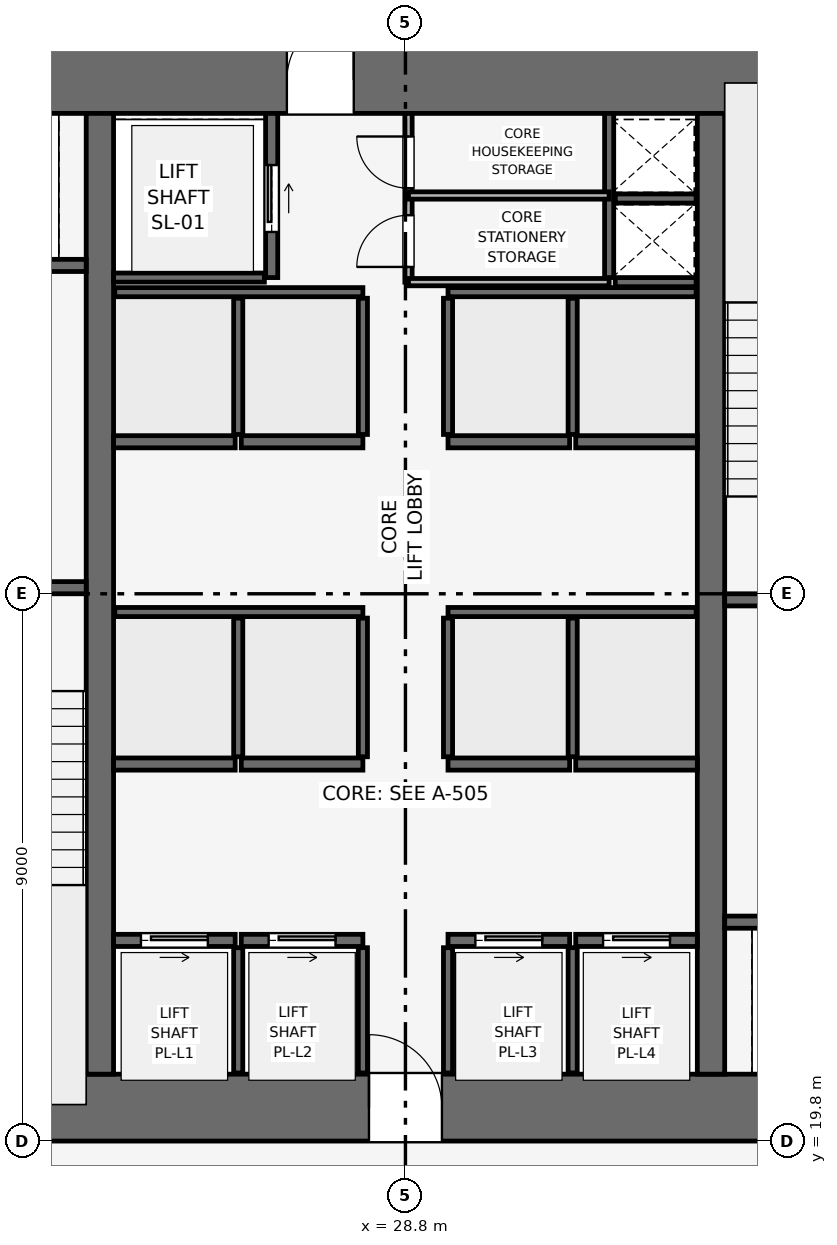
"""IFC4 building model, lengths in metres.
Left out: names, types, materials, properties, quantities, classifications, styles, units other than length and angle.
Written with IfcOpenShell. Run it as: python <this file> out.ifc"""

import sys

from ifc_helpers import new_model, si_unit, direction, frame, frame_2d, origin, place, context, subcontext, project, spatial, rectangle, extrude, element, fill, save


model = new_model("IFC4")
c1 = context("Model", 3, precision=1e-05, world=origin(), true_north=direction((0.0, 1.0)))
c2 = subcontext(c1, "Body", "Model", "MODEL_VIEW")
j1 = project(units=[si_unit("LENGTHUNIT", "METRE"), si_unit("PLANEANGLEUNIT", "RADIAN")], contexts=[c1])
p1 = place(None, origin())
s1 = spatial("IfcSite", under=j1, at=p1, CompositionType="ELEMENT")
p2 = place(p1, origin())
s2 = spatial("IfcBuilding", under=s1, at=p2, CompositionType="ELEMENT")
p3 = place(p2, frame((0.0, 0.0, 104.1)))
s3 = spatial("IfcBuildingStorey", under=s2, at=p3, CompositionType="ELEMENT", Elevation=104.1)
p4 = place(p3, frame((19.8, 20.35, 0.0), z_axis=(0.0, 0.0, 1.0), x_axis=(1.0, 0.0, 0.0)))
e1 = element("IfcWall", 1, at=p4, inside=s3, PredefinedType="SHEAR", context=c2, shape_type="SweptSolid", body=[
    extrude(rectangle(XDim=18.0, YDim=1.1, at=frame_2d((9.0, 0.0))), origin(), (0.0, 0.0, 1.0), 3.9),
])
p5 = place(p4, frame((8.4, 0.0, 0.0)))
e2 = element("IfcOpeningElement", 2, at=p5, cuts=e1, PredefinedType="OPENING", context=c2, shape_type="SweptSolid", body=[
    extrude(rectangle(XDim=1.2, YDim=2.2, at=frame_2d((0.6, 1.1))), frame((0.0, 0.56, 0.0), z_axis=(0.0, -1.0, 0.0), x_axis=(1.0, 0.0, 0.0)), (0.0, 0.0, 1.0), 1.12),
])
p6 = place(p3, frame((19.8, 37.25, 0.0), z_axis=(0.0, 0.0, 1.0), x_axis=(1.0, 0.0, 0.0)))
e3 = element("IfcWall", 3, at=p6, inside=s3, PredefinedType="SHEAR", context=c2, shape_type="SweptSolid", body=[
    extrude(rectangle(XDim=18.0, YDim=1.1, at=frame_2d((9.0, 0.0))), origin(), (0.0, 0.0, 1.0), 3.9),
])
p7 = place(p6, frame((7.05, 0.0, 0.0)))
e4 = element("IfcOpeningElement", 4, at=p7, cuts=e3, PredefinedType="OPENING", context=c2, shape_type="SweptSolid", body=[
    extrude(rectangle(XDim=1.1, YDim=2.15, at=frame_2d((0.55, 1.075))), frame((0.0, 0.56, 0.0), z_axis=(0.0, -1.0, 0.0), x_axis=(1.0, 0.0, 0.0)), (0.0, 0.0, 1.0), 1.12),
])
for number, where, z_axis, x_axis in (
    (5, (23.775, 20.9, 0.0), (0.0, 0.0, 1.0), (0.0, 1.0, 0.0)),
    (6, (33.825, 20.9, 0.0), (0.0, 0.0, 1.0), (0.0, 1.0, 0.0)),
):
    element("IfcWall", number, at=place(p3, frame(where, z_axis=z_axis, x_axis=x_axis)), inside=s3, PredefinedType="SHEAR", context=c2, shape_type="SweptSolid", body=[
        extrude(rectangle(XDim=15.8, YDim=0.45, at=frame_2d((7.9, 0.0))), origin(), (0.0, 0.0, 1.0), 3.9),
    ])
p8 = place(p3, frame((20.4, 28.9, 0.0), z_axis=(0.0, 0.0, 1.0), x_axis=(1.0, 0.0, 0.0)))
e7 = element("IfcWall", 7, at=p8, inside=s3, PredefinedType="SHEAR", context=c2, shape_type="SweptSolid", body=[
    extrude(rectangle(XDim=3.15, YDim=0.2, at=frame_2d((1.575, 0.0))), origin(), (0.0, 0.0, 1.0), 3.54),
])
p9 = place(p8, frame((0.8, 0.0, 0.0)))
e8 = element("IfcOpeningElement", 8, at=p9, cuts=e7, PredefinedType="OPENING", context=c2, shape_type="SweptSolid", body=[
    extrude(rectangle(XDim=1.0, YDim=2.1, at=frame_2d((0.5, 1.05))), frame((0.0, 0.11, 0.0), z_axis=(0.0, -1.0, 0.0), x_axis=(1.0, 0.0, 0.0)), (0.0, 0.0, 1.0), 0.22),
])
p10 = place(p3, frame((34.05, 28.7, 0.0), z_axis=(0.0, 0.0, 1.0), x_axis=(1.0, 0.0, 0.0)))
e9 = element("IfcWall", 9, at=p10, inside=s3, PredefinedType="SHEAR", context=c2, shape_type="SweptSolid", body=[
    extrude(rectangle(XDim=3.15, YDim=0.2, at=frame_2d((1.575, 0.0))), origin(), (0.0, 0.0, 1.0), 3.54),
])
p11 = place(p10, frame((0.8, 0.0, 0.0)))
e10 = element("IfcOpeningElement", 10, at=p11, cuts=e9, PredefinedType="OPENING", context=c2, shape_type="SweptSolid", body=[
    extrude(rectangle(XDim=1.0, YDim=2.1, at=frame_2d((0.5, 1.05))), frame((0.0, 0.11, 0.0), z_axis=(0.0, -1.0, 0.0), x_axis=(1.0, 0.0, 0.0)), (0.0, 0.0, 1.0), 0.22),
])
p12 = place(p3, frame((32.15, 34.0, 0.0), z_axis=(0.0, 0.0, 1.0), x_axis=(0.0, 1.0, 0.0)))
e11 = element("IfcWall", 11, at=p12, inside=s3, PredefinedType="SHEAR", context=c2, shape_type="SweptSolid", body=[
    extrude(rectangle(XDim=2.7, YDim=0.15, at=frame_2d((1.35, 0.0))), origin(), (0.0, 0.0, 1.0), 3.54),
])
for number, where, z_axis, x_axis in (
    (12, (32.25, 33.925, 0.0), (0.0, 0.0, 1.0), (1.0, 0.0, 0.0)),
    (13, (32.25, 35.3, 0.0), (0.0, 0.0, 1.0), (1.0, 0.0, 0.0)),
):
    element("IfcWall", number, at=place(p3, frame(where, z_axis=z_axis, x_axis=x_axis)), inside=s3, PredefinedType="SHEAR", context=c2, shape_type="SweptSolid", body=[
        extrude(rectangle(XDim=1.33, YDim=0.15, at=frame_2d((0.665, 0.0))), origin(), (0.0, 0.0, 1.0), 3.54),
    ])
p13 = place(p3, frame((20.5, 34.2, 0.0), z_axis=(0.0, 0.0, 1.0), x_axis=(1.0, 0.0, 0.0)))
e14 = element("IfcWall", 14, at=p13, inside=s3, PredefinedType="SHEAR", context=c2, shape_type="SweptSolid", body=[
    extrude(rectangle(XDim=3.05, YDim=0.2, at=frame_2d((1.525, 0.0))), origin(), (0.0, 0.0, 1.0), 3.54),
])
p14 = place(p13, frame((0.75, 0.0, 0.0)))
e15 = element("IfcOpeningElement", 15, at=p14, cuts=e14, PredefinedType="OPENING", context=c2, shape_type="SweptSolid", body=[
    extrude(rectangle(XDim=1.1, YDim=2.15, at=frame_2d((0.55, 1.075))), frame((0.0, 0.11, 0.0), z_axis=(0.0, -1.0, 0.0), x_axis=(1.0, 0.0, 0.0)), (0.0, 0.0, 1.0), 0.22),
])
p15 = place(p3, frame((34.05, 23.4, 0.0), z_axis=(0.0, 0.0, 1.0), x_axis=(1.0, 0.0, 0.0)))
e16 = element("IfcWall", 16, at=p15, inside=s3, PredefinedType="SHEAR", context=c2, shape_type="SweptSolid", body=[
    extrude(rectangle(XDim=3.05, YDim=0.2, at=frame_2d((1.525, 0.0))), origin(), (0.0, 0.0, 1.0), 3.54),
])
p16 = place(p15, frame((1.2, 0.0, 0.0)))
e17 = element("IfcOpeningElement", 17, at=p16, cuts=e16, PredefinedType="OPENING", context=c2, shape_type="SweptSolid", body=[
    extrude(rectangle(XDim=1.1, YDim=2.15, at=frame_2d((0.55, 1.075))), frame((0.0, 0.11, 0.0), z_axis=(0.0, -1.0, 0.0), x_axis=(1.0, 0.0, 0.0)), (0.0, 0.0, 1.0), 0.22),
])
p17 = place(p3, frame((26.6, 34.0, 0.0), z_axis=(0.0, 0.0, 1.0), x_axis=(0.0, 1.0, 0.0)))
e18 = element("IfcWall", 18, at=p17, inside=s3, PredefinedType="SHEAR", context=c2, shape_type="SweptSolid", body=[
    extrude(rectangle(XDim=2.7, YDim=0.2, at=frame_2d((1.35, 0.0))), origin(), (0.0, 0.0, 1.0), 3.54),
])
p18 = place(p17, frame((0.75, 0.0, 0.0)))
e19 = element("IfcOpeningElement", 19, at=p18, cuts=e18, PredefinedType="OPENING", context=c2, shape_type="SweptSolid", body=[
    extrude(rectangle(XDim=1.1, YDim=2.15, at=frame_2d((0.55, 1.075))), frame((0.0, 0.11, 0.0), z_axis=(0.0, -1.0, 0.0), x_axis=(1.0, 0.0, 0.0)), (0.0, 0.0, 1.0), 0.22),
])
p19 = place(p3, frame((24.0, 34.0, 0.0), z_axis=(0.0, 0.0, 1.0), x_axis=(1.0, 0.0, 0.0)))
e20 = element("IfcWall", 20, at=p19, inside=s3, PredefinedType="SHEAR", context=c2, shape_type="SweptSolid", body=[
    extrude(rectangle(XDim=2.48, YDim=0.15, at=frame_2d((1.24, 0.0))), origin(), (0.0, 0.0, 1.0), 3.54),
])
p20 = place(p3, frame((24.0, 23.1, 0.0), z_axis=(0.0, 0.0, 1.0), x_axis=(1.0, 0.0, 0.0)))
e21 = element("IfcWall", 21, at=p20, inside=s3, PredefinedType="SHEAR", context=c2, shape_type="SweptSolid", body=[
    extrude(rectangle(XDim=2.0, YDim=0.2, at=frame_2d((1.0, 0.0))), origin(), (0.0, 0.0, 1.0), 3.54),
])
p21 = place(p20, frame((0.45, 0.0, 0.0)))
e22 = element("IfcOpeningElement", 22, at=p21, cuts=e21, PredefinedType="OPENING", context=c2, shape_type="SweptSolid", body=[
    extrude(rectangle(XDim=1.1, YDim=2.15, at=frame_2d((0.55, 1.075))), frame((0.0, 0.11, 0.0), z_axis=(0.0, -1.0, 0.0), x_axis=(1.0, 0.0, 0.0)), (0.0, 0.0, 1.0), 0.22),
])
p22 = place(p3, frame((26.1, 23.1, 0.0), z_axis=(0.0, 0.0, 1.0), x_axis=(1.0, 0.0, 0.0)))
e23 = element("IfcWall", 23, at=p22, inside=s3, PredefinedType="SHEAR", context=c2, shape_type="SweptSolid", body=[
    extrude(rectangle(XDim=2.0, YDim=0.2, at=frame_2d((1.0, 0.0))), origin(), (0.0, 0.0, 1.0), 3.54),
])
p23 = place(p22, frame((0.45, 0.0, 0.0)))
e24 = element("IfcOpeningElement", 24, at=p23, cuts=e23, PredefinedType="OPENING", context=c2, shape_type="SweptSolid", body=[
    extrude(rectangle(XDim=1.1, YDim=2.15, at=frame_2d((0.55, 1.075))), frame((0.0, 0.11, 0.0), z_axis=(0.0, -1.0, 0.0), x_axis=(1.0, 0.0, 0.0)), (0.0, 0.0, 1.0), 0.22),
])
p24 = place(p3, frame((29.5, 23.1, 0.0), z_axis=(0.0, 0.0, 1.0), x_axis=(1.0, 0.0, 0.0)))
e25 = element("IfcWall", 25, at=p24, inside=s3, PredefinedType="SHEAR", context=c2, shape_type="SweptSolid", body=[
    extrude(rectangle(XDim=2.0, YDim=0.2, at=frame_2d((1.0, 0.0))), origin(), (0.0, 0.0, 1.0), 3.54),
])
p25 = place(p24, frame((0.45, 0.0, 0.0)))
e26 = element("IfcOpeningElement", 26, at=p25, cuts=e25, PredefinedType="OPENING", context=c2, shape_type="SweptSolid", body=[
    extrude(rectangle(XDim=1.1, YDim=2.15, at=frame_2d((0.55, 1.075))), frame((0.0, 0.11, 0.0), z_axis=(0.0, -1.0, 0.0), x_axis=(1.0, 0.0, 0.0)), (0.0, 0.0, 1.0), 0.22),
])
p26 = place(p3, frame((31.6, 23.1, 0.0), z_axis=(0.0, 0.0, 1.0), x_axis=(1.0, 0.0, 0.0)))
e27 = element("IfcWall", 27, at=p26, inside=s3, PredefinedType="SHEAR", context=c2, shape_type="SweptSolid", body=[
    extrude(rectangle(XDim=2.0, YDim=0.2, at=frame_2d((1.0, 0.0))), origin(), (0.0, 0.0, 1.0), 3.54),
])
p27 = place(p26, frame((0.45, 0.0, 0.0)))
e28 = element("IfcOpeningElement", 28, at=p27, cuts=e27, PredefinedType="OPENING", context=c2, shape_type="SweptSolid", body=[
    extrude(rectangle(XDim=1.1, YDim=2.15, at=frame_2d((0.55, 1.075))), frame((0.0, 0.11, 0.0), z_axis=(0.0, -1.0, 0.0), x_axis=(1.0, 0.0, 0.0)), (0.0, 0.0, 1.0), 0.22),
])
for number, where, z_axis, x_axis in (
    (29, (24.0, 26.0, 0.0), (0.0, 0.0, 1.0), (1.0, 0.0, 0.0)),
    (30, (26.1, 26.0, 0.0), (0.0, 0.0, 1.0), (1.0, 0.0, 0.0)),
    (31, (29.5, 26.0, 0.0), (0.0, 0.0, 1.0), (1.0, 0.0, 0.0)),
    (32, (31.6, 26.0, 0.0), (0.0, 0.0, 1.0), (1.0, 0.0, 0.0)),
    (33, (24.0, 31.3, 0.0), (0.0, 0.0, 1.0), (1.0, 0.0, 0.0)),
    (34, (26.1, 31.3, 0.0), (0.0, 0.0, 1.0), (1.0, 0.0, 0.0)),
    (35, (29.5, 31.3, 0.0), (0.0, 0.0, 1.0), (1.0, 0.0, 0.0)),
    (36, (31.6, 31.3, 0.0), (0.0, 0.0, 1.0), (1.0, 0.0, 0.0)),
):
    element("IfcWall", number, at=place(p3, frame(where, z_axis=z_axis, x_axis=x_axis)), inside=s3, PredefinedType="SHEAR", context=c2, shape_type="SweptSolid", body=[
        extrude(rectangle(XDim=2.0, YDim=0.2, at=frame_2d((1.0, 0.0))), origin(), (0.0, 0.0, 1.0), 3.54),
    ])
for number, where, z_axis, x_axis in (
    (37, (26.05, 20.92, 0.0), (0.0, 0.0, 1.0), (0.0, 1.0, 0.0)),
    (38, (28.1, 20.92, 0.0), (0.0, 0.0, 1.0), (0.0, 1.0, 0.0)),
    (39, (29.5, 20.92, 0.0), (0.0, 0.0, 1.0), (0.0, 1.0, 0.0)),
    (40, (31.55, 20.92, 0.0), (0.0, 0.0, 1.0), (0.0, 1.0, 0.0)),
):
    element("IfcWall", number, at=place(p3, frame(where, z_axis=z_axis, x_axis=x_axis)), inside=s3, PredefinedType="SHEAR", context=c2, shape_type="SweptSolid", body=[
        extrude(rectangle(XDim=2.06, YDim=0.15, at=frame_2d((1.03, 0.0))), origin(), (0.0, 0.0, 1.0), 3.54),
    ])
for number, where, z_axis, x_axis in (
    (41, (24.02, 28.5, 0.0), (0.0, 0.0, 1.0), (1.0, 0.0, 0.0)),
    (42, (29.5, 28.5, 0.0), (0.0, 0.0, 1.0), (1.0, 0.0, 0.0)),
):
    element("IfcWall", number, at=place(p3, frame(where, z_axis=z_axis, x_axis=x_axis)), inside=s3, PredefinedType="SHEAR", context=c2, shape_type="SweptSolid", body=[
        extrude(rectangle(XDim=4.08, YDim=0.15, at=frame_2d((2.04, 0.0))), origin(), (0.0, 0.0, 1.0), 3.54),
    ])
for number, where, z_axis, x_axis in (
    (43, (26.05, 26.12, 0.0), (0.0, 0.0, 1.0), (0.0, 1.0, 0.0)),
    (44, (28.1, 26.12, 0.0), (0.0, 0.0, 1.0), (0.0, 1.0, 0.0)),
    (45, (29.5, 26.12, 0.0), (0.0, 0.0, 1.0), (0.0, 1.0, 0.0)),
    (46, (31.55, 26.12, 0.0), (0.0, 0.0, 1.0), (0.0, 1.0, 0.0)),
):
    element("IfcWall", number, at=place(p3, frame(where, z_axis=z_axis, x_axis=x_axis)), inside=s3, PredefinedType="SHEAR", context=c2, shape_type="SweptSolid", body=[
        extrude(rectangle(XDim=2.28, YDim=0.15, at=frame_2d((1.14, 0.0))), origin(), (0.0, 0.0, 1.0), 3.54),
    ])
for number, where, z_axis, x_axis in (
    (47, (24.02, 33.76, 0.0), (0.0, 0.0, 1.0), (1.0, 0.0, 0.0)),
    (48, (29.5, 33.76, 0.0), (0.0, 0.0, 1.0), (1.0, 0.0, 0.0)),
):
    element("IfcWall", number, at=place(p3, frame(where, z_axis=z_axis, x_axis=x_axis)), inside=s3, PredefinedType="SHEAR", context=c2, shape_type="SweptSolid", body=[
        extrude(rectangle(XDim=4.08, YDim=0.15, at=frame_2d((2.04, 0.0))), origin(), (0.0, 0.0, 1.0), 3.54),
    ])
for number, where, z_axis, x_axis in (
    (49, (26.05, 31.42, 0.0), (0.0, 0.0, 1.0), (0.0, 1.0, 0.0)),
    (50, (28.1, 31.42, 0.0), (0.0, 0.0, 1.0), (0.0, 1.0, 0.0)),
    (51, (29.5, 31.42, 0.0), (0.0, 0.0, 1.0), (0.0, 1.0, 0.0)),
    (52, (31.55, 31.42, 0.0), (0.0, 0.0, 1.0), (0.0, 1.0, 0.0)),
):
    element("IfcWall", number, at=place(p3, frame(where, z_axis=z_axis, x_axis=x_axis)), inside=s3, PredefinedType="SHEAR", context=c2, shape_type="SweptSolid", body=[
        extrude(rectangle(XDim=2.24, YDim=0.15, at=frame_2d((1.12, 0.0))), origin(), (0.0, 0.0, 1.0), 3.54),
    ])
p28 = place(p3, frame((28.85, 33.925, 0.0), z_axis=(0.0, 0.0, 1.0), x_axis=(0.0, 1.0, 0.0)))
e53 = element("IfcWall", 53, at=p28, inside=s3, PredefinedType="PARTITIONING", context=c2, shape_type="SweptSolid", body=[
    extrude(rectangle(XDim=2.775, YDim=0.12, at=frame_2d((1.387, 0.0))), origin(), (0.0, 0.0, 1.0), 3.54),
])
p29 = place(p28, frame((0.25, 0.0, 0.0)))
e54 = element("IfcOpeningElement", 54, at=p29, cuts=e53, PredefinedType="OPENING", context=c2, shape_type="SweptSolid", body=[
    extrude(rectangle(XDim=0.85, YDim=2.1, at=frame_2d((0.425, 1.05))), frame((0.0, 0.07, 0.0), z_axis=(0.0, -1.0, 0.0), x_axis=(1.0, 0.0, 0.0)), (0.0, 0.0, 1.0), 0.14),
])
p30 = place(p28, frame((1.545, 0.0, 0.0)))
e55 = element("IfcOpeningElement", 55, at=p30, cuts=e53, PredefinedType="OPENING", context=c2, shape_type="SweptSolid", body=[
    extrude(rectangle(XDim=0.85, YDim=2.1, at=frame_2d((0.425, 1.05))), frame((0.0, 0.07, 0.0), z_axis=(0.0, -1.0, 0.0), x_axis=(1.0, 0.0, 0.0)), (0.0, 0.0, 1.0), 0.14),
])
for number, where, z_axis, x_axis in (
    (56, (28.85, 35.35, 0.0), (0.0, 0.0, 1.0), (1.0, 0.0, 0.0)),
    (57, (28.85, 33.925, 0.0), (0.0, 0.0, 1.0), (1.0, 0.0, 0.0)),
):
    element("IfcWall", number, at=place(p3, frame(where, z_axis=z_axis, x_axis=x_axis)), inside=s3, PredefinedType="PARTITIONING", context=c2, shape_type="SweptSolid", body=[
        extrude(rectangle(XDim=3.3, YDim=0.12, at=frame_2d((1.65, 0.0))), origin(), (0.0, 0.0, 1.0), 3.54),
    ])
p31 = place(p18, origin())
e58 = element("IfcDoor", 58, at=p31, inside=s3, OperationType="SLIDING_TO_RIGHT", PredefinedType="DOOR", context=c2, shape_type="SweptSolid", body=[
    extrude(rectangle(XDim=1.1, YDim=2.15, at=frame_2d((0.55, 1.075))), frame((0.0, 0.025, 0.0), z_axis=(0.0, -1.0, 0.0), x_axis=(1.0, 0.0, 0.0)), (0.0, 0.0, 1.0), 0.05),
])
fill(e19, e58)
p32 = place(p21, origin())
e59 = element("IfcDoor", 59, at=p32, inside=s3, OperationType="SLIDING_TO_RIGHT", PredefinedType="DOOR", context=c2, shape_type="SweptSolid", body=[
    extrude(rectangle(XDim=1.1, YDim=2.15, at=frame_2d((0.55, 1.075))), frame((0.0, 0.025, 0.0), z_axis=(0.0, -1.0, 0.0), x_axis=(1.0, 0.0, 0.0)), (0.0, 0.0, 1.0), 0.05),
])
fill(e22, e59)
p33 = place(p23, origin())
e60 = element("IfcDoor", 60, at=p33, inside=s3, OperationType="SLIDING_TO_RIGHT", PredefinedType="DOOR", context=c2, shape_type="SweptSolid", body=[
    extrude(rectangle(XDim=1.1, YDim=2.15, at=frame_2d((0.55, 1.075))), frame((0.0, 0.025, 0.0), z_axis=(0.0, -1.0, 0.0), x_axis=(1.0, 0.0, 0.0)), (0.0, 0.0, 1.0), 0.05),
])
fill(e24, e60)
p34 = place(p25, origin())
e61 = element("IfcDoor", 61, at=p34, inside=s3, OperationType="SLIDING_TO_RIGHT", PredefinedType="DOOR", context=c2, shape_type="SweptSolid", body=[
    extrude(rectangle(XDim=1.1, YDim=2.15, at=frame_2d((0.55, 1.075))), frame((0.0, 0.025, 0.0), z_axis=(0.0, -1.0, 0.0), x_axis=(1.0, 0.0, 0.0)), (0.0, 0.0, 1.0), 0.05),
])
fill(e26, e61)
p35 = place(p27, origin())
e62 = element("IfcDoor", 62, at=p35, inside=s3, OperationType="SLIDING_TO_RIGHT", PredefinedType="DOOR", context=c2, shape_type="SweptSolid", body=[
    extrude(rectangle(XDim=1.1, YDim=2.15, at=frame_2d((0.55, 1.075))), frame((0.0, 0.025, 0.0), z_axis=(0.0, -1.0, 0.0), x_axis=(1.0, 0.0, 0.0)), (0.0, 0.0, 1.0), 0.05),
])
fill(e28, e62)
p36 = place(p29, origin())
e63 = element("IfcDoor", 63, at=p36, inside=s3, OperationType="SINGLE_SWING_LEFT", PredefinedType="DOOR", context=c2, shape_type="SweptSolid", body=[
    extrude(rectangle(XDim=0.85, YDim=2.1, at=frame_2d((0.425, 1.05))), frame((0.0, 0.025, 0.0), z_axis=(0.0, -1.0, 0.0), x_axis=(1.0, 0.0, 0.0)), (0.0, 0.0, 1.0), 0.05),
])
fill(e54, e63)
p37 = place(p30, origin())
e64 = element("IfcDoor", 64, at=p37, inside=s3, OperationType="SINGLE_SWING_RIGHT", PredefinedType="DOOR", context=c2, shape_type="SweptSolid", body=[
    extrude(rectangle(XDim=0.85, YDim=2.1, at=frame_2d((0.425, 1.05))), frame((0.0, 0.025, 0.0), z_axis=(0.0, -1.0, 0.0), x_axis=(1.0, 0.0, 0.0)), (0.0, 0.0, 1.0), 0.05),
])
fill(e55, e64)
p38 = place(p5, origin())
e65 = element("IfcDoor", 65, at=p38, inside=s3, OperationType="SINGLE_SWING_LEFT", PredefinedType="DOOR", context=c2, shape_type="SweptSolid", body=[
    extrude(rectangle(XDim=1.2, YDim=2.2, at=frame_2d((0.6, 1.1))), frame((0.0, 0.025, 0.0), z_axis=(0.0, -1.0, 0.0), x_axis=(1.0, 0.0, 0.0)), (0.0, 0.0, 1.0), 0.05),
])
fill(e2, e65)
p39 = place(p7, origin())
e66 = element("IfcDoor", 66, at=p39, inside=s3, OperationType="SINGLE_SWING_RIGHT", PredefinedType="DOOR", context=c2, shape_type="SweptSolid", body=[
    extrude(rectangle(XDim=1.1, YDim=2.15, at=frame_2d((0.55, 1.075))), frame((0.0, 0.025, 0.0), z_axis=(0.0, -1.0, 0.0), x_axis=(1.0, 0.0, 0.0)), (0.0, 0.0, 1.0), 0.05),
])
fill(e4, e66)
save(model, sys.argv[1])
